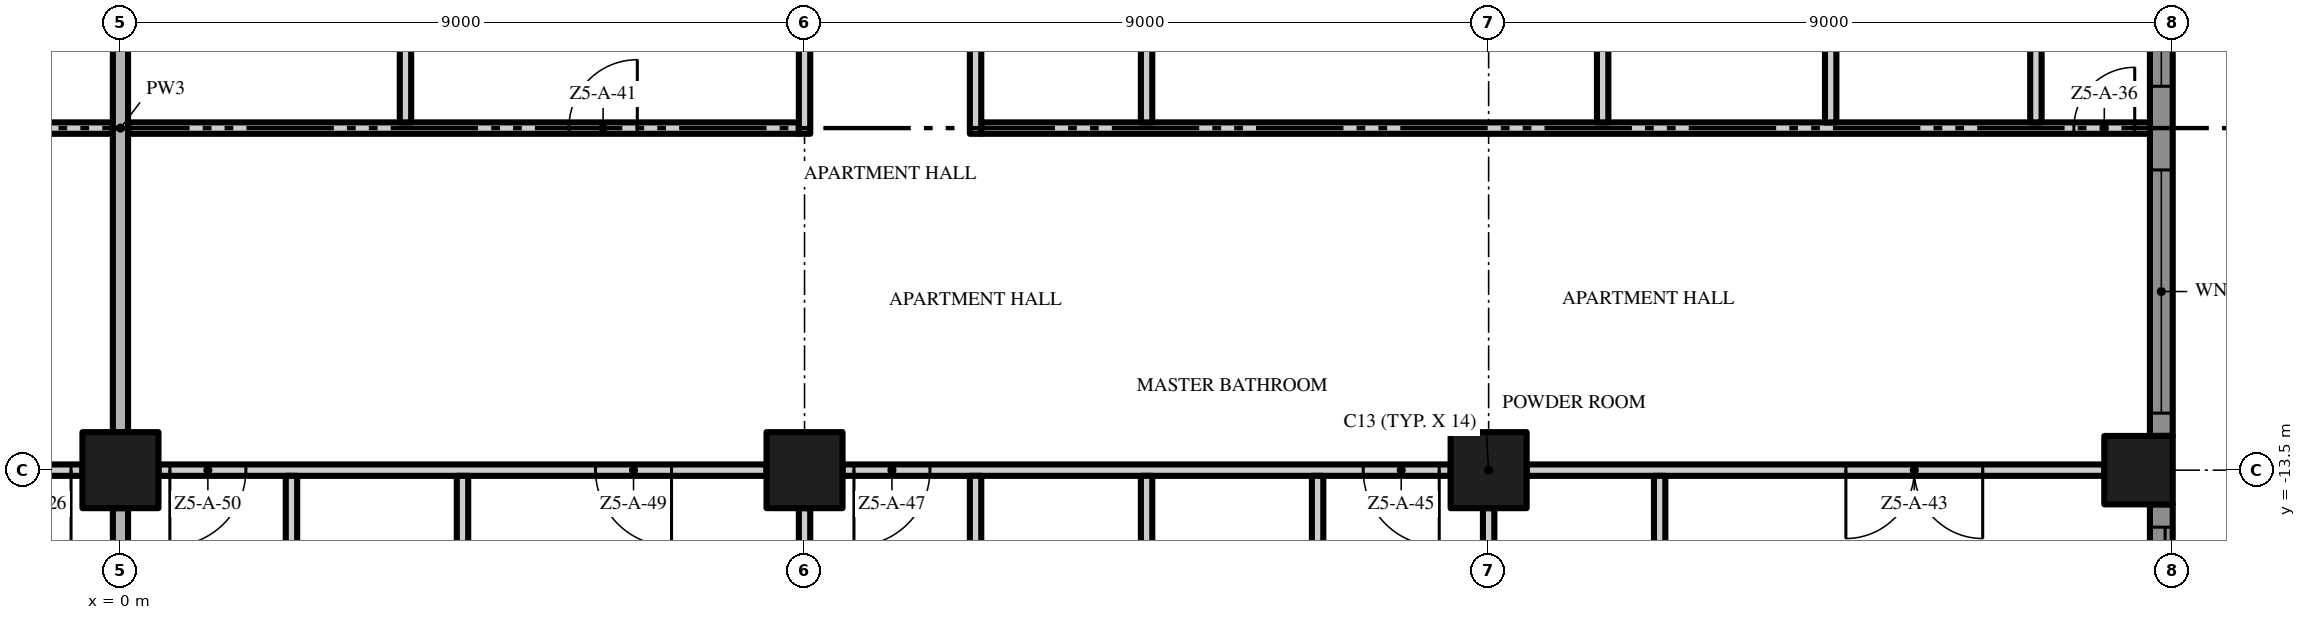
"""IFC4 building model, lengths in metres.
Left out: names, types, materials, properties, quantities, classifications, styles, units other than length and angle.
Written with IfcOpenShell. Run it as: python <this file> out.ifc"""

import sys

from ifc_helpers import new_model, si_unit, direction, frame, frame_2d, origin, origin_2d, place, context, subcontext, project, spatial, polyline, rectangle, outline, extrude, element, fill, save


model = new_model("IFC4")
c1 = context("Model", 3, precision=1e-05, world=origin(), true_north=direction((0.0, 1.0)))
c2 = subcontext(c1, "Body", "Model", "MODEL_VIEW")
j1 = project(units=[si_unit("LENGTHUNIT", "METRE"), si_unit("PLANEANGLEUNIT", "RADIAN")], contexts=[c1])
p1 = place(None, origin())
s1 = spatial("IfcSite", under=j1, at=p1, CompositionType="ELEMENT")
p2 = place(p1, origin())
s2 = spatial("IfcBuilding", under=s1, at=p2, CompositionType="ELEMENT")
p3 = place(p2, frame((0.0, 0.0, 242.6)))
s3 = spatial("IfcBuildingStorey", under=s2, at=p3, CompositionType="ELEMENT", Elevation=242.6)
for number, where, z_axis, x_axis in (
    (1, (0.0, -13.5, 0.0), (0.0, 0.0, 1.0), (1.0, 0.0, 0.0)),
    (2, (18.0, -13.5, 0.0), (0.0, 0.0, 1.0), (1.0, 0.0, 0.0)),
):
    element("IfcColumn", number, at=place(p3, frame(where, z_axis=z_axis, x_axis=x_axis)), inside=s3, PredefinedType="COLUMN", context=c2, shape_type="SweptSolid", body=[
        extrude(rectangle(XDim=1.0, YDim=1.0, at=origin_2d()), origin(), (0.0, 0.0, 1.0), 3.5),
    ])
p4 = place(p3, frame((26.55, -13.5, 0.0), z_axis=(0.0, 0.0, 1.0), x_axis=(1.0, 0.0, 0.0)))
e3 = element("IfcColumn", 3, at=p4, inside=s3, PredefinedType="COLUMN", context=c2, shape_type="SweptSolid", body=[
    extrude(rectangle(XDim=0.9, YDim=0.9, at=origin_2d()), origin(), (0.0, 0.0, 1.0), 3.5),
])
p5 = place(p3, frame((9.0, -13.5, 0.0), z_axis=(0.0, 0.0, 1.0), x_axis=(1.0, 0.0, 0.0)))
e4 = element("IfcColumn", 4, at=p5, inside=s3, PredefinedType="COLUMN", context=c2, shape_type="SweptSolid", body=[
    extrude(rectangle(XDim=1.0, YDim=1.0, at=origin_2d()), origin(), (0.0, 0.0, 1.0), 3.5),
])
p6 = place(p3, frame((26.85, -13.95, 0.0), z_axis=(0.0, 0.0, 1.0), x_axis=(0.0, -1.0, 0.0)))
e5 = element("IfcWall", 5, at=p6, inside=s3, PredefinedType="SOLIDWALL", context=c2, shape_type="SweptSolid", body=[
    extrude(rectangle(XDim=3.75, YDim=0.3, at=frame_2d((1.875, 0.0))), origin(), (0.0, 0.0, 1.0), 3.5),
])
p7 = place(p6, frame((0.3, 0.0, 0.0)))
e6 = element("IfcOpeningElement", 6, at=p7, cuts=e5, PredefinedType="OPENING", context=c2, shape_type="SweptSolid", body=[
    extrude(rectangle(XDim=3.15, YDim=2.4, at=frame_2d((1.575, 1.2))), frame((0.0, 0.16, 0.0), z_axis=(0.0, -1.0, 0.0), x_axis=(1.0, 0.0, 0.0)), (0.0, 0.0, 1.0), 0.32),
])
p8 = place(p3, frame((26.85, -4.95, 0.0), z_axis=(0.0, 0.0, 1.0), x_axis=(0.0, -1.0, 0.0)))
e7 = element("IfcWall", 7, at=p8, inside=s3, PredefinedType="SOLIDWALL", context=c2, shape_type="SweptSolid", body=[
    extrude(rectangle(XDim=8.1, YDim=0.3, at=frame_2d((4.05, 0.0))), origin(), (0.0, 0.0, 1.0), 3.5),
])
p9 = place(p8, frame((4.6, 0.0, 0.45)))
e8 = element("IfcOpeningElement", 8, at=p9, cuts=e7, PredefinedType="OPENING", context=c2, shape_type="SweptSolid", body=[
    extrude(rectangle(XDim=3.2, YDim=2.65, at=frame_2d((1.6, 1.325))), frame((0.0, 0.16, 0.0), z_axis=(0.0, -1.0, 0.0), x_axis=(1.0, 0.0, 0.0)), (0.0, 0.0, 1.0), 0.32),
])
p10 = place(p8, frame((0.3, 0.0, 0.45)))
e9 = element("IfcOpeningElement", 9, at=p10, cuts=e7, PredefinedType="OPENING", context=c2, shape_type="SweptSolid", body=[
    extrude(rectangle(XDim=3.2, YDim=2.65, at=frame_2d((1.6, 1.325))), frame((0.0, 0.16, 0.0), z_axis=(0.0, -1.0, 0.0), x_axis=(1.0, 0.0, 0.0)), (0.0, 0.0, 1.0), 0.32),
])
p11 = place(p3, origin())
e10 = element("IfcWall", 10, at=p11, inside=s3, PredefinedType="USERDEFINED", context=c2, shape_type="SweptSolid", body=[
    extrude(outline(polyline([(28.8, -18.0), (29.505, -16.5), (29.941, -15.0), (30.0, -14.25), (29.941, -13.5), (29.505, -12.0), (28.8, -10.5), (28.095, -9.0), (27.659, -7.5), (27.6, -6.75), (27.659, -6.0), (28.095, -4.5), (28.8, -3.0), (29.505, -1.5), (29.941, 0.0), (30.0, 0.75), (29.941, 1.5), (29.505, 3.0), (28.8, 4.5), (28.095, 6.0), (27.659, 7.5), (27.6, 8.25), (27.659, 9.0), (28.095, 10.5), (28.8, 12.0), (29.505, 13.5), (29.941, 15.0), (30.0, 15.75), (29.941, 16.5), (29.505, 18.0), (29.265, 17.93), (29.694, 16.455), (29.749, 15.75), (29.694, 15.045), (29.271, 13.589), (28.574, 12.106), (27.86, 10.589), (27.411, 9.045), (27.349, 8.25), (27.411, 7.455), (27.86, 5.911), (28.574, 4.394), (29.271, 2.911), (29.694, 1.455), (29.749, 0.75), (29.694, 0.045), (29.271, -1.411), (28.574, -2.894), (27.86, -4.411), (27.411, -5.955), (27.349, -6.75), (27.411, -7.545), (27.86, -9.089), (28.574, -10.606), (29.271, -12.089), (29.694, -13.545), (29.749, -14.25), (29.694, -14.955), (29.271, -16.411), (28.574, -17.894), (28.8, -18.0)])), origin(), (0.0, 0.0, 1.0), 0.9),
])
p12 = place(p3, frame((-0.5, -13.5, 0.0), z_axis=(0.0, 0.0, 1.0), x_axis=(-1.0, 0.0, 0.0)))
e11 = element("IfcWall", 11, at=p12, inside=s3, PredefinedType="PARTITIONING", context=c2, shape_type="SweptSolid", body=[
    extrude(rectangle(XDim=8.0, YDim=0.15, at=frame_2d((4.0, 0.0))), origin(), (0.0, 0.0, 1.0), 3.5),
])
p13 = place(p12, frame((0.15, 0.0, 0.0)))
e12 = element("IfcOpeningElement", 12, at=p13, cuts=e11, PredefinedType="OPENING", context=c2, shape_type="SweptSolid", body=[
    extrude(rectangle(XDim=1.0, YDim=2.4, at=frame_2d((0.5, 1.2))), frame((0.0, 0.085, 0.0), z_axis=(0.0, -1.0, 0.0), x_axis=(1.0, 0.0, 0.0)), (0.0, 0.0, 1.0), 0.17),
])
p14 = place(p12, frame((6.85, 0.0, 0.0)))
e13 = element("IfcOpeningElement", 13, at=p14, cuts=e11, PredefinedType="OPENING", context=c2, shape_type="SweptSolid", body=[
    extrude(rectangle(XDim=1.0, YDim=2.4, at=frame_2d((0.5, 1.2))), frame((0.0, 0.085, 0.0), z_axis=(0.0, -1.0, 0.0), x_axis=(1.0, 0.0, 0.0)), (0.0, 0.0, 1.0), 0.17),
])
p15 = place(p3, frame((8.5, -13.5, 0.0), z_axis=(0.0, 0.0, 1.0), x_axis=(-1.0, 0.0, 0.0)))
e14 = element("IfcWall", 14, at=p15, inside=s3, PredefinedType="PARTITIONING", context=c2, shape_type="SweptSolid", body=[
    extrude(rectangle(XDim=8.0, YDim=0.15, at=frame_2d((4.0, 0.0))), origin(), (0.0, 0.0, 1.0), 3.5),
])
p16 = place(p15, frame((1.25, 0.0, 0.0)))
e15 = element("IfcOpeningElement", 15, at=p16, cuts=e14, PredefinedType="OPENING", context=c2, shape_type="SweptSolid", body=[
    extrude(rectangle(XDim=1.0, YDim=2.4, at=frame_2d((0.5, 1.2))), frame((0.0, 0.085, 0.0), z_axis=(0.0, -1.0, 0.0), x_axis=(1.0, 0.0, 0.0)), (0.0, 0.0, 1.0), 0.17),
])
p17 = place(p15, frame((6.85, 0.0, 0.0)))
e16 = element("IfcOpeningElement", 16, at=p17, cuts=e14, PredefinedType="OPENING", context=c2, shape_type="SweptSolid", body=[
    extrude(rectangle(XDim=1.0, YDim=2.4, at=frame_2d((0.5, 1.2))), frame((0.0, 0.085, 0.0), z_axis=(0.0, -1.0, 0.0), x_axis=(1.0, 0.0, 0.0)), (0.0, 0.0, 1.0), 0.17),
])
p18 = place(p3, frame((17.5, -13.5, 0.0), z_axis=(0.0, 0.0, 1.0), x_axis=(-1.0, 0.0, 0.0)))
e17 = element("IfcWall", 17, at=p18, inside=s3, PredefinedType="PARTITIONING", context=c2, shape_type="SweptSolid", body=[
    extrude(rectangle(XDim=8.0, YDim=0.15, at=frame_2d((4.0, 0.0))), origin(), (0.0, 0.0, 1.0), 3.5),
])
p19 = place(p18, frame((0.15, 0.0, 0.0)))
e18 = element("IfcOpeningElement", 18, at=p19, cuts=e17, PredefinedType="OPENING", context=c2, shape_type="SweptSolid", body=[
    extrude(rectangle(XDim=1.0, YDim=2.4, at=frame_2d((0.5, 1.2))), frame((0.0, 0.085, 0.0), z_axis=(0.0, -1.0, 0.0), x_axis=(1.0, 0.0, 0.0)), (0.0, 0.0, 1.0), 0.17),
])
p20 = place(p18, frame((6.85, 0.0, 0.0)))
e19 = element("IfcOpeningElement", 19, at=p20, cuts=e17, PredefinedType="OPENING", context=c2, shape_type="SweptSolid", body=[
    extrude(rectangle(XDim=1.0, YDim=2.4, at=frame_2d((0.5, 1.2))), frame((0.0, 0.085, 0.0), z_axis=(0.0, -1.0, 0.0), x_axis=(1.0, 0.0, 0.0)), (0.0, 0.0, 1.0), 0.17),
])
p21 = place(p3, frame((26.1, -13.5, 0.0), z_axis=(0.0, 0.0, 1.0), x_axis=(-1.0, 0.0, 0.0)))
e20 = element("IfcWall", 20, at=p21, inside=s3, PredefinedType="PARTITIONING", context=c2, shape_type="SweptSolid", body=[
    extrude(rectangle(XDim=7.6, YDim=0.15, at=frame_2d((3.8, 0.0))), origin(), (0.0, 0.0, 1.0), 3.5),
])
p22 = place(p21, frame((1.6, 0.0, 0.0)))
e21 = element("IfcOpeningElement", 21, at=p22, cuts=e20, PredefinedType="OPENING", context=c2, shape_type="SweptSolid", body=[
    extrude(rectangle(XDim=1.8, YDim=2.4, at=frame_2d((0.9, 1.2))), frame((0.0, 0.085, 0.0), z_axis=(0.0, -1.0, 0.0), x_axis=(1.0, 0.0, 0.0)), (0.0, 0.0, 1.0), 0.17),
])
p23 = place(p3, frame((-11.625, -9.0, 0.0), z_axis=(0.0, 0.0, 1.0), x_axis=(1.0, 0.0, 0.0)))
e22 = element("IfcWall", 22, at=p23, inside=s3, PredefinedType="PARTITIONING", context=c2, shape_type="SweptSolid", body=[
    extrude(rectangle(XDim=11.525, YDim=0.15, at=frame_2d((5.763, 0.0))), origin(), (0.0, 0.0, 1.0), 3.5),
])
p24 = place(p23, frame((4.675, 0.0, 0.0)))
e23 = element("IfcOpeningElement", 23, at=p24, cuts=e22, PredefinedType="OPENING", context=c2, shape_type="SweptSolid", body=[
    extrude(rectangle(XDim=1.0, YDim=2.4, at=frame_2d((0.5, 1.2))), frame((0.0, 0.085, 0.0), z_axis=(0.0, -1.0, 0.0), x_axis=(1.0, 0.0, 0.0)), (0.0, 0.0, 1.0), 0.17),
])
p25 = place(p3, frame((0.1, -9.0, 0.0), z_axis=(0.0, 0.0, 1.0), x_axis=(1.0, 0.0, 0.0)))
e24 = element("IfcWall", 24, at=p25, inside=s3, PredefinedType="PARTITIONING", context=c2, shape_type="SweptSolid", body=[
    extrude(rectangle(XDim=8.825, YDim=0.15, at=frame_2d((4.412, 0.0))), origin(), (0.0, 0.0, 1.0), 3.5),
])
p26 = place(p25, frame((5.8, 0.0, 0.0)))
e25 = element("IfcOpeningElement", 25, at=p26, cuts=e24, PredefinedType="OPENING", context=c2, shape_type="SweptSolid", body=[
    extrude(rectangle(XDim=0.9, YDim=2.1, at=frame_2d((0.45, 1.05))), frame((0.0, 0.085, 0.0), z_axis=(0.0, -1.0, 0.0), x_axis=(1.0, 0.0, 0.0)), (0.0, 0.0, 1.0), 0.17),
])
p27 = place(p3, frame((11.325, -9.0, 0.0), z_axis=(0.0, 0.0, 1.0), x_axis=(1.0, 0.0, 0.0)))
e26 = element("IfcWall", 26, at=p27, inside=s3, PredefinedType="PARTITIONING", context=c2, shape_type="SweptSolid", body=[
    extrude(rectangle(XDim=15.375, YDim=0.15, at=frame_2d((7.688, 0.0))), origin(), (0.0, 0.0, 1.0), 3.5),
])
p28 = place(p27, frame((14.375, 0.0, 0.0)))
e27 = element("IfcOpeningElement", 27, at=p28, cuts=e26, PredefinedType="OPENING", context=c2, shape_type="SweptSolid", body=[
    extrude(rectangle(XDim=0.8, YDim=2.0, at=frame_2d((0.4, 1.0))), frame((0.0, 0.085, 0.0), z_axis=(0.0, -1.0, 0.0), x_axis=(1.0, 0.0, 0.0)), (0.0, 0.0, 1.0), 0.17),
])
p29 = place(p3, frame((0.0, -21.6, 0.0), z_axis=(0.0, 0.0, 1.0), x_axis=(0.0, 1.0, 0.0)))
e28 = element("IfcWall", 28, at=p29, inside=s3, PredefinedType="PARTITIONING", context=c2, shape_type="SweptSolid", body=[
    extrude(rectangle(XDim=7.6, YDim=0.2, at=frame_2d((3.8, 0.0))), origin(), (0.0, 0.0, 1.0), 3.5),
])
p30 = place(p3, frame((0.0, -13.0, 0.0), z_axis=(0.0, 0.0, 1.0), x_axis=(0.0, 1.0, 0.0)))
e29 = element("IfcWall", 29, at=p30, inside=s3, PredefinedType="PARTITIONING", context=c2, shape_type="SweptSolid", body=[
    extrude(rectangle(XDim=8.0, YDim=0.2, at=frame_2d((4.0, 0.0))), origin(), (0.0, 0.0, 1.0), 3.5),
])
p31 = place(p3, frame((2.25, -16.575, 0.0), z_axis=(0.0, 0.0, 1.0), x_axis=(0.0, 1.0, 0.0)))
e30 = element("IfcWall", 30, at=p31, inside=s3, PredefinedType="PARTITIONING", context=c2, shape_type="SweptSolid", body=[
    extrude(rectangle(XDim=3.0, YDim=0.15, at=frame_2d((1.5, 0.0))), origin(), (0.0, 0.0, 1.0), 3.5),
])
p32 = place(p3, frame((3.75, -8.925, 0.0), z_axis=(0.0, 0.0, 1.0), x_axis=(0.0, 1.0, 0.0)))
e31 = element("IfcWall", 31, at=p32, inside=s3, PredefinedType="PARTITIONING", context=c2, shape_type="SweptSolid", body=[
    extrude(rectangle(XDim=4.35, YDim=0.15, at=frame_2d((2.175, 0.0))), origin(), (0.0, 0.0, 1.0), 3.5),
])
p33 = place(p32, frame((1.75, 0.0, 0.0)))
e32 = element("IfcOpeningElement", 32, at=p33, cuts=e31, PredefinedType="OPENING", context=c2, shape_type="SweptSolid", body=[
    extrude(rectangle(XDim=0.9, YDim=2.1, at=frame_2d((0.45, 1.05))), frame((0.0, 0.085, 0.0), z_axis=(0.0, -1.0, 0.0), x_axis=(1.0, 0.0, 0.0)), (0.0, 0.0, 1.0), 0.17),
])
p34 = place(p3, frame((4.5, -22.2, 0.0), z_axis=(0.0, 0.0, 1.0), x_axis=(0.0, 1.0, 0.0)))
e33 = element("IfcWall", 33, at=p34, inside=s3, PredefinedType="PARTITIONING", context=c2, shape_type="SweptSolid", body=[
    extrude(rectangle(XDim=8.625, YDim=0.15, at=frame_2d((4.312, 0.0))), origin(), (0.0, 0.0, 1.0), 3.5),
])
p35 = place(p3, frame((9.0, -21.6, 0.0), z_axis=(0.0, 0.0, 1.0), x_axis=(0.0, 1.0, 0.0)))
e34 = element("IfcWall", 34, at=p35, inside=s3, PredefinedType="PARTITIONING", context=c2, shape_type="SweptSolid", body=[
    extrude(rectangle(XDim=7.6, YDim=0.15, at=frame_2d((3.8, 0.0))), origin(), (0.0, 0.0, 1.0), 3.5),
])
p36 = place(p3, frame((9.0, -9.075, 0.0), z_axis=(0.0, 0.0, 1.0), x_axis=(0.0, 1.0, 0.0)))
e35 = element("IfcWall", 35, at=p36, inside=s3, PredefinedType="PARTITIONING", context=c2, shape_type="SweptSolid", body=[
    extrude(rectangle(XDim=4.075, YDim=0.15, at=frame_2d((2.038, 0.0))), origin(), (0.0, 0.0, 1.0), 3.5),
])
p37 = place(p3, frame((11.25, -16.575, 0.0), z_axis=(0.0, 0.0, 1.0), x_axis=(0.0, 1.0, 0.0)))
e36 = element("IfcWall", 36, at=p37, inside=s3, PredefinedType="PARTITIONING", context=c2, shape_type="SweptSolid", body=[
    extrude(rectangle(XDim=3.0, YDim=0.15, at=frame_2d((1.5, 0.0))), origin(), (0.0, 0.0, 1.0), 3.5),
])
p38 = place(p3, frame((11.25, -4.425, 0.0), z_axis=(0.0, 0.0, 1.0), x_axis=(0.0, -1.0, 0.0)))
e37 = element("IfcWall", 37, at=p38, inside=s3, PredefinedType="PARTITIONING", context=c2, shape_type="SweptSolid", body=[
    extrude(rectangle(XDim=4.65, YDim=0.15, at=frame_2d((2.325, 0.0))), origin(), (0.0, 0.0, 1.0), 3.5),
])
p39 = place(p38, frame((1.875, 0.0, 0.0)))
e38 = element("IfcOpeningElement", 38, at=p39, cuts=e37, PredefinedType="OPENING", context=c2, shape_type="SweptSolid", body=[
    extrude(rectangle(XDim=0.9, YDim=2.1, at=frame_2d((0.45, 1.05))), frame((0.0, 0.085, 0.0), z_axis=(0.0, -1.0, 0.0), x_axis=(1.0, 0.0, 0.0)), (0.0, 0.0, 1.0), 0.17),
])
p40 = place(p3, frame((13.5, -22.2, 0.0), z_axis=(0.0, 0.0, 1.0), x_axis=(0.0, 1.0, 0.0)))
e39 = element("IfcWall", 39, at=p40, inside=s3, PredefinedType="PARTITIONING", context=c2, shape_type="SweptSolid", body=[
    extrude(rectangle(XDim=8.625, YDim=0.15, at=frame_2d((4.312, 0.0))), origin(), (0.0, 0.0, 1.0), 3.5),
])
p41 = place(p3, frame((13.5, -8.925, 0.0), z_axis=(0.0, 0.0, 1.0), x_axis=(0.0, 1.0, 0.0)))
e40 = element("IfcWall", 40, at=p41, inside=s3, PredefinedType="PARTITIONING", context=c2, shape_type="SweptSolid", body=[
    extrude(rectangle(XDim=4.35, YDim=0.15, at=frame_2d((2.175, 0.0))), origin(), (0.0, 0.0, 1.0), 3.5),
])
p42 = place(p3, frame((15.75, -16.575, 0.0), z_axis=(0.0, 0.0, 1.0), x_axis=(0.0, 1.0, 0.0)))
e41 = element("IfcWall", 41, at=p42, inside=s3, PredefinedType="PARTITIONING", context=c2, shape_type="SweptSolid", body=[
    extrude(rectangle(XDim=3.0, YDim=0.15, at=frame_2d((1.5, 0.0))), origin(), (0.0, 0.0, 1.0), 3.5),
])
p43 = place(p3, frame((18.0, -21.6, 0.0), z_axis=(0.0, 0.0, 1.0), x_axis=(0.0, 1.0, 0.0)))
e42 = element("IfcWall", 42, at=p43, inside=s3, PredefinedType="PARTITIONING", context=c2, shape_type="SweptSolid", body=[
    extrude(rectangle(XDim=7.6, YDim=0.15, at=frame_2d((3.8, 0.0))), origin(), (0.0, 0.0, 1.0), 3.5),
])
p44 = place(p3, frame((19.5, -8.925, 0.0), z_axis=(0.0, 0.0, 1.0), x_axis=(0.0, 1.0, 0.0)))
e43 = element("IfcWall", 43, at=p44, inside=s3, PredefinedType="PARTITIONING", context=c2, shape_type="SweptSolid", body=[
    extrude(rectangle(XDim=4.35, YDim=0.15, at=frame_2d((2.175, 0.0))), origin(), (0.0, 0.0, 1.0), 3.5),
])
p45 = place(p3, frame((20.25, -16.575, 0.0), z_axis=(0.0, 0.0, 1.0), x_axis=(0.0, 1.0, 0.0)))
e44 = element("IfcWall", 44, at=p45, inside=s3, PredefinedType="PARTITIONING", context=c2, shape_type="SweptSolid", body=[
    extrude(rectangle(XDim=3.0, YDim=0.15, at=frame_2d((1.5, 0.0))), origin(), (0.0, 0.0, 1.0), 3.5),
])
for number, where, z_axis, x_axis in (
    (45, (22.5, -8.925, 0.0), (0.0, 0.0, 1.0), (0.0, 1.0, 0.0)),
    (46, (25.2, -8.925, 0.0), (0.0, 0.0, 1.0), (0.0, 1.0, 0.0)),
):
    element("IfcWall", number, at=place(p3, frame(where, z_axis=z_axis, x_axis=x_axis)), inside=s3, PredefinedType="PARTITIONING", context=c2, shape_type="SweptSolid", body=[
        extrude(rectangle(XDim=4.35, YDim=0.15, at=frame_2d((2.175, 0.0))), origin(), (0.0, 0.0, 1.0), 3.5),
    ])
p46 = place(p7, origin())
e47 = element("IfcDoor", 47, at=p46, inside=s3, OperationType="SINGLE_SWING_LEFT", PredefinedType="DOOR", context=c2, shape_type="SweptSolid", body=[
    extrude(rectangle(XDim=3.15, YDim=2.4, at=frame_2d((1.575, 1.2))), frame((0.0, 0.025, 0.0), z_axis=(0.0, -1.0, 0.0), x_axis=(1.0, 0.0, 0.0)), (0.0, 0.0, 1.0), 0.05),
])
fill(e6, e47)
p47 = place(p9, origin())
e48 = element("IfcWindow", 48, at=p47, inside=s3, PartitioningType="SINGLE_PANEL", PredefinedType="WINDOW", context=c2, shape_type="SweptSolid", body=[
    extrude(rectangle(XDim=3.2, YDim=2.65, at=frame_2d((1.6, 1.325))), frame((0.0, 0.03, 0.0), z_axis=(0.0, -1.0, 0.0), x_axis=(1.0, 0.0, 0.0)), (0.0, 0.0, 1.0), 0.06),
])
fill(e8, e48)
p48 = place(p10, origin())
e49 = element("IfcWindow", 49, at=p48, inside=s3, PartitioningType="SINGLE_PANEL", PredefinedType="WINDOW", context=c2, shape_type="SweptSolid", body=[
    extrude(rectangle(XDim=3.2, YDim=2.65, at=frame_2d((1.6, 1.325))), frame((0.0, 0.03, 0.0), z_axis=(0.0, -1.0, 0.0), x_axis=(1.0, 0.0, 0.0)), (0.0, 0.0, 1.0), 0.06),
])
fill(e9, e49)
p49 = place(p13, origin())
e50 = element("IfcDoor", 50, at=p49, inside=s3, OperationType="SINGLE_SWING_LEFT", PredefinedType="DOOR", context=c2, shape_type="SweptSolid", body=[
    extrude(rectangle(XDim=1.0, YDim=2.4, at=frame_2d((0.5, 1.2))), frame((0.0, 0.025, 0.0), z_axis=(0.0, -1.0, 0.0), x_axis=(1.0, 0.0, 0.0)), (0.0, 0.0, 1.0), 0.05),
])
fill(e12, e50)
p50 = place(p28, origin())
e51 = element("IfcDoor", 51, at=p50, inside=s3, OperationType="SINGLE_SWING_RIGHT", PredefinedType="DOOR", context=c2, shape_type="SweptSolid", body=[
    extrude(rectangle(XDim=0.8, YDim=2.0, at=frame_2d((0.4, 1.0))), frame((0.0, 0.025, 0.0), z_axis=(0.0, -1.0, 0.0), x_axis=(1.0, 0.0, 0.0)), (0.0, 0.0, 1.0), 0.05),
])
fill(e27, e51)
p51 = place(p26, origin())
e52 = element("IfcDoor", 52, at=p51, inside=s3, OperationType="SINGLE_SWING_RIGHT", PredefinedType="DOOR", context=c2, shape_type="SweptSolid", body=[
    extrude(rectangle(XDim=0.9, YDim=2.1, at=frame_2d((0.45, 1.05))), frame((0.0, 0.025, 0.0), z_axis=(0.0, -1.0, 0.0), x_axis=(1.0, 0.0, 0.0)), (0.0, 0.0, 1.0), 0.05),
])
fill(e25, e52)
p52 = place(p22, origin())
e53 = element("IfcDoor", 53, at=p52, inside=s3, OperationType="DOUBLE_DOOR_SINGLE_SWING", PredefinedType="DOOR", context=c2, shape_type="SweptSolid", body=[
    extrude(rectangle(XDim=1.8, YDim=2.4, at=frame_2d((0.9, 1.2))), frame((0.0, 0.025, 0.0), z_axis=(0.0, -1.0, 0.0), x_axis=(1.0, 0.0, 0.0)), (0.0, 0.0, 1.0), 0.05),
])
fill(e21, e53)
p53 = place(p19, origin())
e54 = element("IfcDoor", 54, at=p53, inside=s3, OperationType="SINGLE_SWING_LEFT", PredefinedType="DOOR", context=c2, shape_type="SweptSolid", body=[
    extrude(rectangle(XDim=1.0, YDim=2.4, at=frame_2d((0.5, 1.2))), frame((0.0, 0.025, 0.0), z_axis=(0.0, -1.0, 0.0), x_axis=(1.0, 0.0, 0.0)), (0.0, 0.0, 1.0), 0.05),
])
fill(e18, e54)
p54 = place(p20, origin())
e55 = element("IfcDoor", 55, at=p54, inside=s3, OperationType="SINGLE_SWING_RIGHT", PredefinedType="DOOR", context=c2, shape_type="SweptSolid", body=[
    extrude(rectangle(XDim=1.0, YDim=2.4, at=frame_2d((0.5, 1.2))), frame((0.0, 0.025, 0.0), z_axis=(0.0, -1.0, 0.0), x_axis=(1.0, 0.0, 0.0)), (0.0, 0.0, 1.0), 0.05),
])
fill(e19, e55)
p55 = place(p16, origin())
e56 = element("IfcDoor", 56, at=p55, inside=s3, OperationType="SINGLE_SWING_LEFT", PredefinedType="DOOR", context=c2, shape_type="SweptSolid", body=[
    extrude(rectangle(XDim=1.0, YDim=2.4, at=frame_2d((0.5, 1.2))), frame((0.0, 0.025, 0.0), z_axis=(0.0, -1.0, 0.0), x_axis=(1.0, 0.0, 0.0)), (0.0, 0.0, 1.0), 0.05),
])
fill(e15, e56)
p56 = place(p17, origin())
e57 = element("IfcDoor", 57, at=p56, inside=s3, OperationType="SINGLE_SWING_RIGHT", PredefinedType="DOOR", context=c2, shape_type="SweptSolid", body=[
    extrude(rectangle(XDim=1.0, YDim=2.4, at=frame_2d((0.5, 1.2))), frame((0.0, 0.025, 0.0), z_axis=(0.0, -1.0, 0.0), x_axis=(1.0, 0.0, 0.0)), (0.0, 0.0, 1.0), 0.05),
])
fill(e16, e57)
save(model, sys.argv[1])
